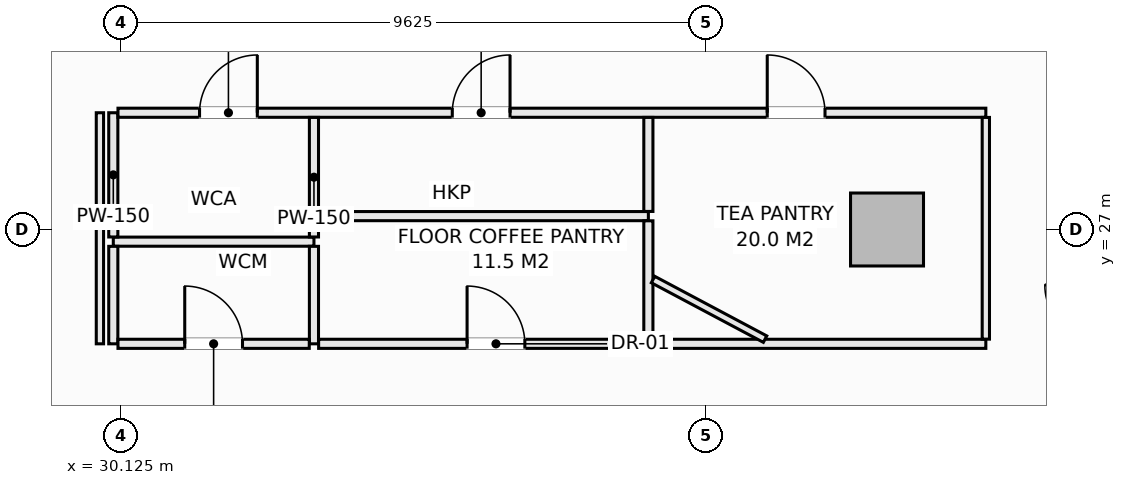
"""IFC4 building model, lengths in metres.
Left out: names, types, materials, properties, quantities, classifications, styles, units other than length and angle.
Written with IfcOpenShell. Run it as: python <this file> out.ifc"""

import sys

from ifc_helpers import new_model, si_unit, direction, frame, frame_2d, origin, origin_2d, place, context, subcontext, project, spatial, rectangle, extrude, element, fill, save


model = new_model("IFC4")
c1 = context("Model", 3, precision=1e-05, world=origin(), true_north=direction((0.0, 1.0)))
c2 = subcontext(c1, "Body", "Model", "MODEL_VIEW")
j1 = project(units=[si_unit("LENGTHUNIT", "METRE"), si_unit("PLANEANGLEUNIT", "RADIAN")], contexts=[c1])
p1 = place(None, origin())
s1 = spatial("IfcSite", under=j1, at=p1, CompositionType="ELEMENT")
p2 = place(p1, origin())
s2 = spatial("IfcBuilding", under=s1, at=p2, CompositionType="ELEMENT")
p3 = place(p2, frame((0.0, 0.0, 72.7)))
s3 = spatial("IfcBuildingStorey", under=s2, at=p3, CompositionType="ELEMENT", Elevation=72.7)
p4 = place(p3, frame((42.725, 27.0, -0.28), z_axis=(0.0, 0.0, 1.0), x_axis=(1.0, 0.0, 0.0)))
e1 = element("IfcColumn", 1, at=p4, inside=s3, PredefinedType="COLUMN", context=c2, shape_type="SweptSolid", body=[
    extrude(rectangle(XDim=1.2, YDim=1.2, at=origin_2d()), origin(), (0.0, 0.0, 1.0), 3.85),
])
p5 = place(p3, frame((30.0, 26.8, 0.0), z_axis=(0.0, 0.0, 1.0), x_axis=(1.0, 0.0, 0.0)))
e2 = element("IfcWall", 2, at=p5, inside=s3, PredefinedType="PARTITIONING", context=c2, shape_type="SweptSolid", body=[
    extrude(rectangle(XDim=3.3, YDim=0.15, at=frame_2d((1.65, 0.0))), origin(), (0.0, 0.0, 1.0), 3.57),
])
p6 = place(p3, frame((30.0, 25.12, 0.0), z_axis=(0.0, 0.0, 1.0), x_axis=(0.0, 1.0, 0.0)))
e3 = element("IfcWall", 3, at=p6, inside=s3, PredefinedType="PARTITIONING", context=c2, shape_type="SweptSolid", body=[
    extrude(rectangle(XDim=1.603, YDim=0.15, at=frame_2d((0.801, 0.0))), origin(), (0.0, 0.0, 1.0), 3.57),
])
p7 = place(p3, frame((30.0, 26.877, 0.0), z_axis=(0.0, 0.0, 1.0), x_axis=(0.0, 1.0, 0.0)))
e4 = element("IfcWall", 4, at=p7, inside=s3, PredefinedType="PARTITIONING", context=c2, shape_type="SweptSolid", body=[
    extrude(rectangle(XDim=2.043, YDim=0.15, at=frame_2d((1.021, 0.0))), origin(), (0.0, 0.0, 1.0), 3.57),
])
p8 = place(p3, frame((30.077, 28.92, 0.0), z_axis=(0.0, 0.0, 1.0), x_axis=(1.0, 0.0, 0.0)))
e5 = element("IfcWall", 5, at=p8, inside=s3, PredefinedType="PARTITIONING", context=c2, shape_type="SweptSolid", body=[
    extrude(rectangle(XDim=14.273, YDim=0.15, at=frame_2d((7.137, 0.0))), origin(), (0.0, 0.0, 1.0), 3.57),
])
p9 = place(p8, frame((1.342, 0.0, 0.0)))
e6 = element("IfcOpeningElement", 6, at=p9, cuts=e5, PredefinedType="OPENING", context=c2, shape_type="SweptSolid", body=[
    extrude(rectangle(XDim=0.95, YDim=2.1, at=frame_2d((0.475, 1.05))), frame((0.0, 0.085, 0.0), z_axis=(0.0, -1.0, 0.0), x_axis=(1.0, 0.0, 0.0)), (0.0, 0.0, 1.0), 0.17),
])
p10 = place(p8, frame((5.498, 0.0, 0.0)))
e7 = element("IfcOpeningElement", 7, at=p10, cuts=e5, PredefinedType="OPENING", context=c2, shape_type="SweptSolid", body=[
    extrude(rectangle(XDim=0.95, YDim=2.1, at=frame_2d((0.475, 1.05))), frame((0.0, 0.085, 0.0), z_axis=(0.0, -1.0, 0.0), x_axis=(1.0, 0.0, 0.0)), (0.0, 0.0, 1.0), 0.17),
])
p11 = place(p8, frame((10.678, 0.0, 0.0)))
e8 = element("IfcOpeningElement", 8, at=p11, cuts=e5, PredefinedType="OPENING", context=c2, shape_type="SweptSolid", body=[
    extrude(rectangle(XDim=0.95, YDim=2.1, at=frame_2d((0.475, 1.05))), frame((0.0, 0.085, 0.0), z_axis=(0.0, -1.0, 0.0), x_axis=(1.0, 0.0, 0.0)), (0.0, 0.0, 1.0), 0.17),
])
p12 = place(p3, frame((33.3, 25.12, 0.0), z_axis=(0.0, 0.0, 1.0), x_axis=(0.0, 1.0, 0.0)))
e9 = element("IfcWall", 9, at=p12, inside=s3, PredefinedType="PARTITIONING", context=c2, shape_type="SweptSolid", body=[
    extrude(rectangle(XDim=1.603, YDim=0.15, at=frame_2d((0.801, 0.0))), origin(), (0.0, 0.0, 1.0), 3.57),
])
p13 = place(p3, frame((33.3, 26.877, 0.0), z_axis=(0.0, 0.0, 1.0), x_axis=(0.0, 1.0, 0.0)))
e10 = element("IfcWall", 10, at=p13, inside=s3, PredefinedType="PARTITIONING", context=c2, shape_type="SweptSolid", body=[
    extrude(rectangle(XDim=1.966, YDim=0.15, at=frame_2d((0.983, 0.0))), origin(), (0.0, 0.0, 1.0), 3.57),
])
p14 = place(p3, frame((30.077, 25.12, 0.0), z_axis=(0.0, 0.0, 1.0), x_axis=(1.0, 0.0, 0.0)))
e11 = element("IfcWall", 11, at=p14, inside=s3, PredefinedType="PARTITIONING", context=c2, shape_type="SweptSolid", body=[
    extrude(rectangle(XDim=3.146, YDim=0.15, at=frame_2d((1.573, 0.0))), origin(), (0.0, 0.0, 1.0), 3.57),
])
p15 = place(p14, frame((1.098, 0.0, 0.0)))
e12 = element("IfcOpeningElement", 12, at=p15, cuts=e11, PredefinedType="OPENING", context=c2, shape_type="SweptSolid", body=[
    extrude(rectangle(XDim=0.95, YDim=2.1, at=frame_2d((0.475, 1.05))), frame((0.0, 0.085, 0.0), z_axis=(0.0, -1.0, 0.0), x_axis=(1.0, 0.0, 0.0)), (0.0, 0.0, 1.0), 0.17),
])
p16 = place(p3, frame((33.377, 25.12, 0.0), z_axis=(0.0, 0.0, 1.0), x_axis=(1.0, 0.0, 0.0)))
e13 = element("IfcWall", 13, at=p16, inside=s3, PredefinedType="PARTITIONING", context=c2, shape_type="SweptSolid", body=[
    extrude(rectangle(XDim=10.973, YDim=0.15, at=frame_2d((5.487, 0.0))), origin(), (0.0, 0.0, 1.0), 3.57),
])
p17 = place(p16, frame((2.441, 0.0, 0.0)))
e14 = element("IfcOpeningElement", 14, at=p17, cuts=e13, PredefinedType="OPENING", context=c2, shape_type="SweptSolid", body=[
    extrude(rectangle(XDim=0.95, YDim=2.1, at=frame_2d((0.475, 1.05))), frame((0.0, 0.085, 0.0), z_axis=(0.0, -1.0, 0.0), x_axis=(1.0, 0.0, 0.0)), (0.0, 0.0, 1.0), 0.17),
])
p18 = place(p3, frame((33.377, 27.22, 0.0), z_axis=(0.0, 0.0, 1.0), x_axis=(1.0, 0.0, 0.0)))
e15 = element("IfcWall", 15, at=p18, inside=s3, PredefinedType="PARTITIONING", context=c2, shape_type="SweptSolid", body=[
    extrude(rectangle(XDim=5.423, YDim=0.15, at=frame_2d((2.711, 0.0))), origin(), (0.0, 0.0, 1.0), 3.57),
])
p19 = place(p3, frame((38.8, 25.197, 0.0), z_axis=(0.0, 0.0, 1.0), x_axis=(0.0, 1.0, 0.0)))
e16 = element("IfcWall", 16, at=p19, inside=s3, PredefinedType="PARTITIONING", context=c2, shape_type="SweptSolid", body=[
    extrude(rectangle(XDim=1.946, YDim=0.15, at=frame_2d((0.973, 0.0))), origin(), (0.0, 0.0, 1.0), 3.57),
])
p20 = place(p3, frame((38.8, 27.297, 0.0), z_axis=(0.0, 0.0, 1.0), x_axis=(0.0, 1.0, 0.0)))
e17 = element("IfcWall", 17, at=p20, inside=s3, PredefinedType="PARTITIONING", context=c2, shape_type="SweptSolid", body=[
    extrude(rectangle(XDim=1.546, YDim=0.15, at=frame_2d((0.773, 0.0))), origin(), (0.0, 0.0, 1.0), 3.57),
])
p21 = place(p3, frame((29.78, 25.12, 0.0), z_axis=(0.0, 0.0, 1.0), x_axis=(0.0, 1.0, 0.0)))
e18 = element("IfcWall", 18, at=p21, inside=s3, PredefinedType="PARTITIONING", context=c2, shape_type="SweptSolid", body=[
    extrude(rectangle(XDim=3.8, YDim=0.12, at=frame_2d((1.9, 0.0))), origin(), (0.0, 0.0, 1.0), 3.57),
])
p22 = place(p3, frame((44.35, 25.197, 0.0), z_axis=(0.0, 0.0, 1.0), x_axis=(0.0, 1.0, 0.0)))
e19 = element("IfcWall", 19, at=p22, inside=s3, PredefinedType="PARTITIONING", context=c2, shape_type="SweptSolid", body=[
    extrude(rectangle(XDim=3.646, YDim=0.12, at=frame_2d((1.823, 0.0))), origin(), (0.0, 0.0, 1.0), 3.57),
])
p23 = place(p3, frame((38.877, 26.177, 0.0), z_axis=(0.0, 0.0, 1.0), x_axis=(0.882864132349, -0.469628495527, 0.0)))
e20 = element("IfcWall", 20, at=p23, inside=s3, PredefinedType="PARTITIONING", context=c2, shape_type="SweptSolid", body=[
    extrude(rectangle(XDim=2.087, YDim=0.12, at=frame_2d((1.043, 0.0))), origin(), (0.0, 0.0, 1.0), 3.57),
])
p24 = place(p9, origin())
e21 = element("IfcDoor", 21, at=p24, inside=s3, OperationType="SINGLE_SWING_RIGHT", PredefinedType="DOOR", context=c2, shape_type="SweptSolid", body=[
    extrude(rectangle(XDim=0.95, YDim=2.1, at=frame_2d((0.475, 1.05))), frame((0.0, 0.025, 0.0), z_axis=(0.0, -1.0, 0.0), x_axis=(1.0, 0.0, 0.0)), (0.0, 0.0, 1.0), 0.05),
])
fill(e6, e21)
p25 = place(p15, origin())
e22 = element("IfcDoor", 22, at=p25, inside=s3, OperationType="SINGLE_SWING_LEFT", PredefinedType="DOOR", context=c2, shape_type="SweptSolid", body=[
    extrude(rectangle(XDim=0.95, YDim=2.1, at=frame_2d((0.475, 1.05))), frame((0.0, 0.025, 0.0), z_axis=(0.0, -1.0, 0.0), x_axis=(1.0, 0.0, 0.0)), (0.0, 0.0, 1.0), 0.05),
])
fill(e12, e22)
p26 = place(p10, origin())
e23 = element("IfcDoor", 23, at=p26, inside=s3, OperationType="SINGLE_SWING_RIGHT", PredefinedType="DOOR", context=c2, shape_type="SweptSolid", body=[
    extrude(rectangle(XDim=0.95, YDim=2.1, at=frame_2d((0.475, 1.05))), frame((0.0, 0.025, 0.0), z_axis=(0.0, -1.0, 0.0), x_axis=(1.0, 0.0, 0.0)), (0.0, 0.0, 1.0), 0.05),
])
fill(e7, e23)
p27 = place(p17, origin())
e24 = element("IfcDoor", 24, at=p27, inside=s3, OperationType="SINGLE_SWING_LEFT", PredefinedType="DOOR", context=c2, shape_type="SweptSolid", body=[
    extrude(rectangle(XDim=0.95, YDim=2.1, at=frame_2d((0.475, 1.05))), frame((0.0, 0.025, 0.0), z_axis=(0.0, -1.0, 0.0), x_axis=(1.0, 0.0, 0.0)), (0.0, 0.0, 1.0), 0.05),
])
fill(e14, e24)
p28 = place(p11, origin())
e25 = element("IfcDoor", 25, at=p28, inside=s3, OperationType="SINGLE_SWING_LEFT", PredefinedType="DOOR", context=c2, shape_type="SweptSolid", body=[
    extrude(rectangle(XDim=0.95, YDim=2.1, at=frame_2d((0.475, 1.05))), frame((0.0, 0.025, 0.0), z_axis=(0.0, -1.0, 0.0), x_axis=(1.0, 0.0, 0.0)), (0.0, 0.0, 1.0), 0.05),
])
fill(e8, e25)
save(model, sys.argv[1])
